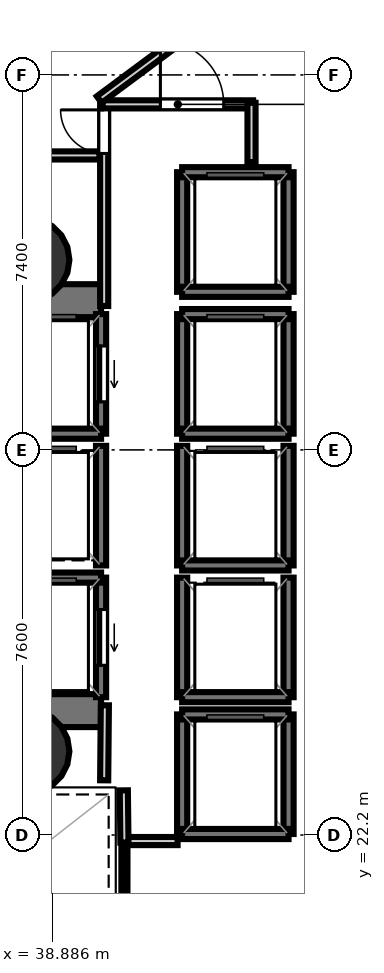
"""IFC4 building model, lengths in metres.
Left out: names, types, materials, properties, quantities, classifications, styles, units other than length and angle.
Written with IfcOpenShell. Run it as: python <this file> out.ifc"""

import sys

from ifc_helpers import new_model, si_unit, direction, frame, frame_2d, origin, origin_2d, place, context, subcontext, project, spatial, rectangle, hollow_circle, extrude, element, fill, save


model = new_model("IFC4")
c1 = context("Model", 3, precision=1e-05, world=origin(), true_north=direction((0.0, 1.0)))
c2 = subcontext(c1, "Body", "Model", "MODEL_VIEW")
j1 = project(units=[si_unit("LENGTHUNIT", "METRE"), si_unit("PLANEANGLEUNIT", "RADIAN")], contexts=[c1])
p1 = place(None, origin())
s1 = spatial("IfcSite", under=j1, at=p1, CompositionType="ELEMENT")
p2 = place(p1, origin())
s2 = spatial("IfcBuilding", under=s1, at=p2, CompositionType="ELEMENT")
p3 = place(p2, frame((0.0, 0.0, 59.9)))
s3 = spatial("IfcBuildingStorey", under=s2, at=p3, CompositionType="ELEMENT", Elevation=59.9)
p4 = place(p3, frame((29.13, 32.745, 0.0), z_axis=(0.0, 0.0, 1.0), x_axis=(1.0, 0.0, 0.0)))
e1 = element("IfcWall", 1, at=p4, inside=s3, PredefinedType="SHEAR", context=c2, shape_type="SweptSolid", body=[
    extrude(rectangle(XDim=10.72, YDim=0.65, at=frame_2d((5.36, 0.0))), origin(), (0.0, 0.0, 1.0), 3.52),
])
p5 = place(p4, frame((1.095, 0.0, 0.0)))
e2 = element("IfcOpeningElement", 2, at=p5, cuts=e1, PredefinedType="OPENING", context=c2, shape_type="SweptSolid", body=[
    extrude(rectangle(XDim=1.25, YDim=2.15, at=frame_2d((0.625, 1.075))), frame((0.0, 0.335, 0.0), z_axis=(0.0, -1.0, 0.0), x_axis=(1.0, 0.0, 0.0)), (0.0, 0.0, 1.0), 0.67),
])
p6 = place(p3, frame((29.13, 24.655, 0.0), z_axis=(0.0, 0.0, 1.0), x_axis=(1.0, 0.0, 0.0)))
e3 = element("IfcWall", 3, at=p6, inside=s3, PredefinedType="SHEAR", context=c2, shape_type="SweptSolid", body=[
    extrude(rectangle(XDim=10.72, YDim=0.65, at=frame_2d((5.36, 0.0))), origin(), (0.0, 0.0, 1.0), 3.52),
])
p7 = place(p6, frame((0.895, 0.0, 0.0)))
e4 = element("IfcOpeningElement", 4, at=p7, cuts=e3, PredefinedType="OPENING", context=c2, shape_type="SweptSolid", body=[
    extrude(rectangle(XDim=1.25, YDim=2.15, at=frame_2d((0.625, 1.075))), frame((0.0, 0.335, 0.0), z_axis=(0.0, -1.0, 0.0), x_axis=(1.0, 0.0, 0.0)), (0.0, 0.0, 1.0), 0.67),
])
for number, where, z_axis, x_axis in (
    (5, (38.4, 33.55, 0.0), (0.0, 0.0, 1.0), (1.0, 0.0, 0.0)),
    (6, (38.4, 23.85, 0.0), (0.0, 0.0, 1.0), (1.0, 0.0, 0.0)),
):
    element("IfcColumn", number, at=place(p3, frame(where, z_axis=z_axis, x_axis=x_axis)), inside=s3, PredefinedType="COLUMN", context=c2, shape_type="SweptSolid", body=[
        extrude(hollow_circle(Radius=0.825, WallThickness=0.04, at=origin_2d()), origin(), (0.0, 0.0, 1.0), 3.7),
    ])
p8 = place(p3, frame((39.85, 30.12, 0.0), z_axis=(0.0, 0.0, 1.0), x_axis=(0.0, 1.0, 0.0)))
e7 = element("IfcWall", 7, at=p8, inside=s3, PredefinedType="SOLIDWALL", context=c2, shape_type="SweptSolid", body=[
    extrude(rectangle(XDim=2.36, YDim=0.2, at=frame_2d((1.18, 0.0))), origin(), (0.0, 0.0, 1.0), 3.52),
])
p9 = place(p8, frame((0.63, 0.0, 0.0)))
e8 = element("IfcOpeningElement", 8, at=p9, cuts=e7, PredefinedType="OPENING", context=c2, shape_type="SweptSolid", body=[
    extrude(rectangle(XDim=1.1, YDim=2.15, at=frame_2d((0.55, 1.075))), frame((0.0, 0.11, 0.0), z_axis=(0.0, -1.0, 0.0), x_axis=(1.0, 0.0, 0.0)), (0.0, 0.0, 1.0), 0.22),
])
p10 = place(p3, frame((37.75, 30.12, 0.0), z_axis=(0.0, 0.0, 1.0), x_axis=(1.0, 0.0, 0.0)))
e9 = element("IfcWall", 9, at=p10, inside=s3, PredefinedType="SOLIDWALL", context=c2, shape_type="SweptSolid", body=[
    extrude(rectangle(XDim=2.1, YDim=0.2, at=frame_2d((1.05, 0.0))), origin(), (0.0, 0.0, 1.0), 3.52),
])
p11 = place(p3, frame((39.85, 24.92, 0.0), z_axis=(0.0, 0.0, 1.0), x_axis=(0.0, 1.0, 0.0)))
e10 = element("IfcWall", 10, at=p11, inside=s3, PredefinedType="SOLIDWALL", context=c2, shape_type="SweptSolid", body=[
    extrude(rectangle(XDim=2.36, YDim=0.2, at=frame_2d((1.18, 0.0))), origin(), (0.0, 0.0, 1.0), 3.52),
])
p12 = place(p11, frame((0.63, 0.0, 0.0)))
e11 = element("IfcOpeningElement", 11, at=p12, cuts=e10, PredefinedType="OPENING", context=c2, shape_type="SweptSolid", body=[
    extrude(rectangle(XDim=1.1, YDim=2.15, at=frame_2d((0.55, 1.075))), frame((0.0, 0.11, 0.0), z_axis=(0.0, -1.0, 0.0), x_axis=(1.0, 0.0, 0.0)), (0.0, 0.0, 1.0), 0.22),
])
p13 = place(p3, frame((37.75, 27.28, 0.0), z_axis=(0.0, 0.0, 1.0), x_axis=(1.0, 0.0, 0.0)))
e12 = element("IfcWall", 12, at=p13, inside=s3, PredefinedType="SOLIDWALL", context=c2, shape_type="SweptSolid", body=[
    extrude(rectangle(XDim=2.1, YDim=0.2, at=frame_2d((1.05, 0.0))), origin(), (0.0, 0.0, 1.0), 3.52),
])
for number, where, z_axis, x_axis in (
    (13, (43.55, 30.12, 0.0), (0.0, 0.0, 1.0), (0.0, 1.0, 0.0)),
    (14, (41.45, 30.12, 0.0), (0.0, 0.0, 1.0), (0.0, 1.0, 0.0)),
):
    element("IfcWall", number, at=place(p3, frame(where, z_axis=z_axis, x_axis=x_axis)), inside=s3, PredefinedType="SOLIDWALL", context=c2, shape_type="SweptSolid", body=[
        extrude(rectangle(XDim=2.36, YDim=0.2, at=frame_2d((1.18, 0.0))), origin(), (0.0, 0.0, 1.0), 3.52),
    ])
for number, where, z_axis, x_axis in (
    (15, (41.45, 32.48, 0.0), (0.0, 0.0, 1.0), (1.0, 0.0, 0.0)),
    (16, (41.45, 30.12, 0.0), (0.0, 0.0, 1.0), (1.0, 0.0, 0.0)),
):
    element("IfcWall", number, at=place(p3, frame(where, z_axis=z_axis, x_axis=x_axis)), inside=s3, PredefinedType="SOLIDWALL", context=c2, shape_type="SweptSolid", body=[
        extrude(rectangle(XDim=2.1, YDim=0.2, at=frame_2d((1.05, 0.0))), origin(), (0.0, 0.0, 1.0), 3.52),
    ])
for number, where, z_axis, x_axis in (
    (17, (43.55, 27.52, 0.0), (0.0, 0.0, 1.0), (0.0, 1.0, 0.0)),
    (18, (41.45, 27.52, 0.0), (0.0, 0.0, 1.0), (0.0, 1.0, 0.0)),
):
    element("IfcWall", number, at=place(p3, frame(where, z_axis=z_axis, x_axis=x_axis)), inside=s3, PredefinedType="SOLIDWALL", context=c2, shape_type="SweptSolid", body=[
        extrude(rectangle(XDim=2.36, YDim=0.2, at=frame_2d((1.18, 0.0))), origin(), (0.0, 0.0, 1.0), 3.52),
    ])
p14 = place(p3, frame((41.45, 27.52, 0.0), z_axis=(0.0, 0.0, 1.0), x_axis=(1.0, 0.0, 0.0)))
e19 = element("IfcWall", 19, at=p14, inside=s3, PredefinedType="SOLIDWALL", context=c2, shape_type="SweptSolid", body=[
    extrude(rectangle(XDim=2.1, YDim=0.2, at=frame_2d((1.05, 0.0))), origin(), (0.0, 0.0, 1.0), 3.52),
])
for number, where, z_axis, x_axis in (
    (20, (43.55, 24.92, 0.0), (0.0, 0.0, 1.0), (0.0, 1.0, 0.0)),
    (21, (41.45, 24.92, 0.0), (0.0, 0.0, 1.0), (0.0, 1.0, 0.0)),
):
    element("IfcWall", number, at=place(p3, frame(where, z_axis=z_axis, x_axis=x_axis)), inside=s3, PredefinedType="SOLIDWALL", context=c2, shape_type="SweptSolid", body=[
        extrude(rectangle(XDim=2.36, YDim=0.2, at=frame_2d((1.18, 0.0))), origin(), (0.0, 0.0, 1.0), 3.52),
    ])
p15 = place(p3, frame((41.45, 24.92, 0.0), z_axis=(0.0, 0.0, 1.0), x_axis=(1.0, 0.0, 0.0)))
e22 = element("IfcWall", 22, at=p15, inside=s3, PredefinedType="SOLIDWALL", context=c2, shape_type="SweptSolid", body=[
    extrude(rectangle(XDim=2.1, YDim=0.2, at=frame_2d((1.05, 0.0))), origin(), (0.0, 0.0, 1.0), 3.52),
])
p16 = place(p3, frame((39.85, 27.52, 0.0), z_axis=(0.0, 0.0, 1.0), x_axis=(0.0, 1.0, 0.0)))
e23 = element("IfcWall", 23, at=p16, inside=s3, PredefinedType="SOLIDWALL", context=c2, shape_type="SweptSolid", body=[
    extrude(rectangle(XDim=2.36, YDim=0.2, at=frame_2d((1.18, 0.0))), origin(), (0.0, 0.0, 1.0), 3.52),
])
for number, where, z_axis, x_axis in (
    (24, (43.55, 22.22, 0.0), (0.0, 0.0, 1.0), (0.0, 1.0, 0.0)),
    (25, (41.45, 22.22, 0.0), (0.0, 0.0, 1.0), (0.0, 1.0, 0.0)),
):
    element("IfcWall", number, at=place(p3, frame(where, z_axis=z_axis, x_axis=x_axis)), inside=s3, PredefinedType="SOLIDWALL", context=c2, shape_type="SweptSolid", body=[
        extrude(rectangle(XDim=2.36, YDim=0.2, at=frame_2d((1.18, 0.0))), origin(), (0.0, 0.0, 1.0), 3.52),
    ])
for number, where, z_axis, x_axis in (
    (26, (41.45, 24.58, 0.0), (0.0, 0.0, 1.0), (1.0, 0.0, 0.0)),
    (27, (41.45, 22.22, 0.0), (0.0, 0.0, 1.0), (1.0, 0.0, 0.0)),
):
    element("IfcWall", number, at=place(p3, frame(where, z_axis=z_axis, x_axis=x_axis)), inside=s3, PredefinedType="SOLIDWALL", context=c2, shape_type="SweptSolid", body=[
        extrude(rectangle(XDim=2.1, YDim=0.2, at=frame_2d((1.05, 0.0))), origin(), (0.0, 0.0, 1.0), 3.52),
    ])
for number, where, z_axis, x_axis in (
    (28, (43.55, 32.92, 0.0), (0.0, 0.0, 1.0), (0.0, 1.0, 0.0)),
    (29, (41.45, 32.92, 0.0), (0.0, 0.0, 1.0), (0.0, 1.0, 0.0)),
):
    element("IfcWall", number, at=place(p3, frame(where, z_axis=z_axis, x_axis=x_axis)), inside=s3, PredefinedType="SOLIDWALL", context=c2, shape_type="SweptSolid", body=[
        extrude(rectangle(XDim=2.36, YDim=0.2, at=frame_2d((1.18, 0.0))), origin(), (0.0, 0.0, 1.0), 3.52),
    ])
for number, where, z_axis, x_axis in (
    (30, (41.45, 35.28, 0.0), (0.0, 0.0, 1.0), (1.0, 0.0, 0.0)),
    (31, (41.45, 32.92, 0.0), (0.0, 0.0, 1.0), (1.0, 0.0, 0.0)),
):
    element("IfcWall", number, at=place(p3, frame(where, z_axis=z_axis, x_axis=x_axis)), inside=s3, PredefinedType="SOLIDWALL", context=c2, shape_type="SweptSolid", body=[
        extrude(rectangle(XDim=2.1, YDim=0.2, at=frame_2d((1.05, 0.0))), origin(), (0.0, 0.0, 1.0), 3.52),
    ])
p17 = place(p3, frame((39.911, 32.64, 0.0), z_axis=(0.0, 0.0, 1.0), x_axis=(0.0, 1.0, 0.0)))
e32 = element("IfcWall", 32, at=p17, inside=s3, PredefinedType="PARTITIONING", context=c2, shape_type="SweptSolid", body=[
    extrude(rectangle(XDim=4.01, YDim=0.16, at=frame_2d((2.005, 0.0))), origin(), (0.0, 0.0, 1.0), 2.84),
])
p18 = place(p17, frame((3.01, 0.0, 0.0)))
e33 = element("IfcOpeningElement", 33, at=p18, cuts=e32, PredefinedType="OPENING", context=c2, shape_type="SweptSolid", body=[
    extrude(rectangle(XDim=0.86, YDim=2.05, at=frame_2d((0.43, 1.025))), frame((0.0, 0.09, 0.0), z_axis=(0.0, -1.0, 0.0), x_axis=(1.0, 0.0, 0.0)), (0.0, 0.0, 1.0), 0.18),
])
p19 = place(p3, frame((39.88, 36.619, 0.0), z_axis=(0.0, 0.0, 1.0), x_axis=(1.0, 0.0, 0.0)))
e34 = element("IfcWall", 34, at=p19, inside=s3, PredefinedType="PARTITIONING", context=c2, shape_type="SweptSolid", body=[
    extrude(rectangle(XDim=2.97, YDim=0.16, at=frame_2d((1.485, 0.0))), origin(), (0.0, 0.0, 1.0), 2.798),
])
p20 = place(p19, frame((1.141, 0.0, 0.0)))
e35 = element("IfcOpeningElement", 35, at=p20, cuts=e34, PredefinedType="OPENING", context=c2, shape_type="SweptSolid", body=[
    extrude(rectangle(XDim=1.25, YDim=2.2, at=frame_2d((0.625, 1.1))), frame((0.0, 0.09, 0.0), z_axis=(0.0, -1.0, 0.0), x_axis=(1.0, 0.0, 0.0)), (0.0, 0.0, 1.0), 0.18),
])
p21 = place(p3, frame((42.819, 36.65, 0.0), z_axis=(0.0, 0.0, 1.0), x_axis=(0.0, -1.0, 0.0)))
e36 = element("IfcWall", 36, at=p21, inside=s3, PredefinedType="PARTITIONING", context=c2, shape_type="SweptSolid", body=[
    extrude(rectangle(XDim=1.17, YDim=0.16, at=frame_2d((0.585, 0.0))), origin(), (0.0, 0.0, 1.0), 2.798),
])
p22 = place(p3, frame((41.36, 22.081, 0.0), z_axis=(0.0, 0.0, 1.0), x_axis=(-1.0, 0.0, 0.0)))
e37 = element("IfcWall", 37, at=p22, inside=s3, PredefinedType="PARTITIONING", context=c2, shape_type="SweptSolid", body=[
    extrude(rectangle(XDim=1.08, YDim=0.16, at=frame_2d((0.54, 0.0))), origin(), (0.0, 0.0, 1.0), 2.84),
])
p23 = place(p3, frame((40.311, 22.05, 0.0), z_axis=(0.0, 0.0, 1.0), x_axis=(-0.011836292006, 0.999929948642, 0.0)))
e38 = element("IfcWall", 38, at=p23, inside=s3, PredefinedType="PARTITIONING", context=c2, shape_type="SweptSolid", body=[
    extrude(rectangle(XDim=1.031, YDim=0.16, at=frame_2d((0.516, 0.0))), origin(), (0.0, 0.0, 1.0), 2.84),
])
p24 = place(p3, frame((39.911, 23.28, 0.0), z_axis=(0.0, 0.0, 1.0), x_axis=(0.009397771291, 0.999955839972, 0.0)))
e39 = element("IfcWall", 39, at=p24, inside=s3, PredefinedType="PARTITIONING", context=c2, shape_type="SweptSolid", body=[
    extrude(rectangle(XDim=1.481, YDim=0.16, at=frame_2d((0.74, 0.0))), origin(), (0.0, 0.0, 1.0), 2.84),
])
p25 = place(p3, frame((43.088, 39.146, 0.0), z_axis=(0.0, 0.0, 1.0), x_axis=(-0.802821627785, -0.596219283453, 0.0)))
e40 = element("IfcWall", 40, at=p25, inside=s3, PredefinedType="PARTITIONING", context=c2, shape_type="SweptSolid", body=[
    extrude(rectangle(XDim=4.078, YDim=0.16, at=frame_2d((2.039, 0.0))), origin(), (0.0, 0.0, 1.0), 2.798),
])
p26 = place(p3, frame((39.818, 35.611, 0.0), z_axis=(0.0, 0.0, 1.0), x_axis=(-1.0, 0.0, 0.0)))
e41 = element("IfcWall", 41, at=p26, inside=s3, PredefinedType="PARTITIONING", context=c2, shape_type="SweptSolid", body=[
    extrude(rectangle(XDim=2.768, YDim=0.16, at=frame_2d((1.384, 0.0))), origin(), (0.0, 0.0, 1.0), 2.84),
])
p27 = place(p3, frame((40.31, 17.972, 0.0), z_axis=(0.0, 0.0, 1.0), x_axis=(0.000305362145, 0.999999953377, 0.0)))
e42 = element("IfcWall", 42, at=p27, inside=s3, PredefinedType="PARTITIONING", context=c2, shape_type="SweptSolid", body=[
    extrude(rectangle(XDim=3.998, YDim=0.12, at=frame_2d((1.999, 0.0))), origin(), (0.0, 0.0, 1.0), 2.84),
])
p28 = place(p9, origin())
e43 = element("IfcDoor", 43, at=p28, inside=s3, OperationType="SLIDING_TO_LEFT", PredefinedType="DOOR", context=c2, shape_type="SweptSolid", body=[
    extrude(rectangle(XDim=1.1, YDim=2.15, at=frame_2d((0.55, 1.075))), frame((0.0, 0.025, 0.0), z_axis=(0.0, -1.0, 0.0), x_axis=(1.0, 0.0, 0.0)), (0.0, 0.0, 1.0), 0.05),
])
fill(e8, e43)
p29 = place(p12, origin())
e44 = element("IfcDoor", 44, at=p29, inside=s3, OperationType="SLIDING_TO_LEFT", PredefinedType="DOOR", context=c2, shape_type="SweptSolid", body=[
    extrude(rectangle(XDim=1.1, YDim=2.15, at=frame_2d((0.55, 1.075))), frame((0.0, 0.025, 0.0), z_axis=(0.0, -1.0, 0.0), x_axis=(1.0, 0.0, 0.0)), (0.0, 0.0, 1.0), 0.05),
])
fill(e11, e44)
p30 = place(p18, origin())
e45 = element("IfcDoor", 45, at=p30, inside=s3, OperationType="SINGLE_SWING_RIGHT", PredefinedType="DOOR", context=c2, shape_type="SweptSolid", body=[
    extrude(rectangle(XDim=0.86, YDim=2.05, at=frame_2d((0.43, 1.025))), frame((0.0, 0.025, 0.0), z_axis=(0.0, -1.0, 0.0), x_axis=(1.0, 0.0, 0.0)), (0.0, 0.0, 1.0), 0.05),
])
fill(e33, e45)
p31 = place(p20, origin())
e46 = element("IfcDoor", 46, at=p31, inside=s3, OperationType="SINGLE_SWING_LEFT", PredefinedType="DOOR", context=c2, shape_type="SweptSolid", body=[
    extrude(rectangle(XDim=1.25, YDim=2.2, at=frame_2d((0.625, 1.1))), frame((0.0, 0.025, 0.0), z_axis=(0.0, -1.0, 0.0), x_axis=(1.0, 0.0, 0.0)), (0.0, 0.0, 1.0), 0.05),
])
fill(e35, e46)
save(model, sys.argv[1])
